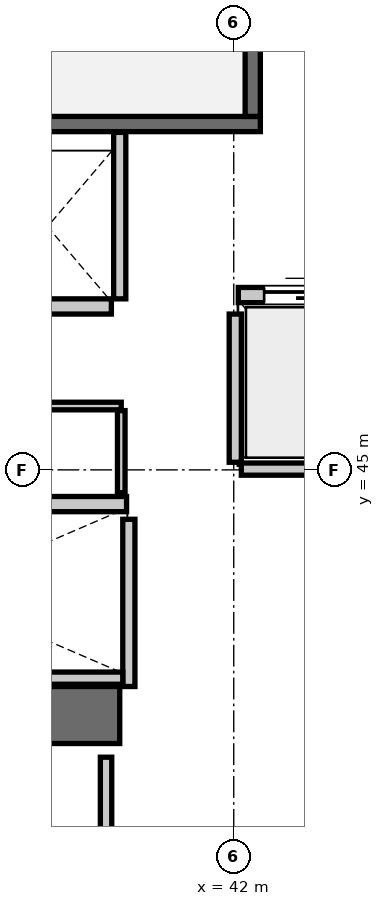
"""IFC4 building model, lengths in metres.
Left out: names, types, materials, properties, quantities, classifications, styles, units other than length and angle.
Written with IfcOpenShell. Run it as: python <this file> out.ifc"""

import sys

from ifc_helpers import new_model, si_unit, direction, frame, frame_2d, origin, place, context, subcontext, project, spatial, rectangle, extrude, element, fill, save


model = new_model("IFC4")
c1 = context("Model", 3, precision=1e-05, world=origin(), true_north=direction((0.0, 1.0)))
c2 = subcontext(c1, "Body", "Model", "MODEL_VIEW")
j1 = project(units=[si_unit("LENGTHUNIT", "METRE"), si_unit("PLANEANGLEUNIT", "RADIAN")], contexts=[c1])
p1 = place(None, origin())
s1 = spatial("IfcSite", under=j1, at=p1, CompositionType="ELEMENT")
p2 = place(p1, origin())
s2 = spatial("IfcBuilding", under=s1, at=p2, CompositionType="ELEMENT")
p3 = place(p2, frame((0.0, 0.0, 196.7)))
s3 = spatial("IfcBuildingStorey", under=s2, at=p3, CompositionType="ELEMENT", Elevation=196.7)
p4 = place(p3, frame((35.1, 41.775, 0.0), z_axis=(0.0, 0.0, 1.0), x_axis=(1.0, 0.0, 0.0)))
e1 = element("IfcWall", 1, at=p4, inside=s3, PredefinedType="SHEAR", context=c2, shape_type="SweptSolid", body=[
    extrude(rectangle(XDim=5.4, YDim=0.75, at=frame_2d((2.7, 0.0))), origin(), (0.0, 0.0, 1.0), 3.85),
])
p5 = place(p3, frame((33.25, 49.55, 0.0), z_axis=(0.0, 0.0, 1.0), x_axis=(1.0, 0.0, 0.0)))
e2 = element("IfcWall", 2, at=p5, inside=s3, PredefinedType="SOLIDWALL", context=c2, shape_type="SweptSolid", body=[
    extrude(rectangle(XDim=9.1, YDim=0.2, at=frame_2d((4.55, 0.0))), origin(), (0.0, 0.0, 1.0), 3.61),
])
p6 = place(p3, frame((42.25, 49.65, 0.0), z_axis=(0.0, 0.0, 1.0), x_axis=(0.0, 1.0, 0.0)))
e3 = element("IfcWall", 3, at=p6, inside=s3, PredefinedType="SOLIDWALL", context=c2, shape_type="SweptSolid", body=[
    extrude(rectangle(XDim=3.6, YDim=0.2, at=frame_2d((1.8, 0.0))), origin(), (0.0, 0.0, 1.0), 3.61),
])
p7 = place(p3, frame((42.06, 47.3, 0.0), z_axis=(0.0, 0.0, 1.0), x_axis=(1.0, 0.0, 0.0)))
e4 = element("IfcWall", 4, at=p7, inside=s3, PredefinedType="SOLIDWALL", context=c2, shape_type="SweptSolid", body=[
    extrude(rectangle(XDim=1.68, YDim=0.2, at=frame_2d((0.84, 0.0))), origin(), (0.0, 0.0, 1.0), 3.61),
])
p8 = place(p7, frame((0.34, 0.0, 0.0)))
e5 = element("IfcOpeningElement", 5, at=p8, cuts=e4, PredefinedType="OPENING", context=c2, shape_type="SweptSolid", body=[
    extrude(rectangle(XDim=1.0, YDim=2.15, at=frame_2d((0.5, 1.075))), frame((0.0, 0.11, 0.0), z_axis=(0.0, -1.0, 0.0), x_axis=(1.0, 0.0, 0.0)), (0.0, 0.0, 1.0), 0.22),
])
p9 = place(p3, frame((38.91, 44.55, 0.0), z_axis=(0.0, 0.0, 1.0), x_axis=(1.0, 0.0, 0.0)))
e6 = element("IfcWall", 6, at=p9, inside=s3, PredefinedType="SOLIDWALL", context=c2, shape_type="SweptSolid", body=[
    extrude(rectangle(XDim=1.68, YDim=0.2, at=frame_2d((0.84, 0.0))), origin(), (0.0, 0.0, 1.0), 3.61),
])
p10 = place(p3, frame((38.71, 47.15, 0.0), z_axis=(0.0, 0.0, 1.0), x_axis=(1.0, 0.0, 0.0)))
e7 = element("IfcWall", 7, at=p10, inside=s3, PredefinedType="SOLIDWALL", context=c2, shape_type="SweptSolid", body=[
    extrude(rectangle(XDim=1.68, YDim=0.2, at=frame_2d((0.84, 0.0))), origin(), (0.0, 0.0, 1.0), 3.61),
])
p11 = place(p3, frame((42.02, 45.1, 0.0), z_axis=(0.0, 0.0, 1.0), x_axis=(0.0, 1.0, 0.0)))
e8 = element("IfcWall", 8, at=p11, inside=s3, PredefinedType="SOLIDWALL", context=c2, shape_type="SweptSolid", body=[
    extrude(rectangle(XDim=1.95, YDim=0.16, at=frame_2d((0.975, 0.0))), origin(), (0.0, 0.0, 1.0), 3.61),
])
p12 = place(p3, frame((42.1, 45.01, 0.0), z_axis=(0.0, 0.0, 1.0), x_axis=(1.0, 0.0, 0.0)))
e9 = element("IfcWall", 9, at=p12, inside=s3, PredefinedType="SOLIDWALL", context=c2, shape_type="SweptSolid", body=[
    extrude(rectangle(XDim=3.45, YDim=0.16, at=frame_2d((1.725, 0.0))), origin(), (0.0, 0.0, 1.0), 3.61),
])
p13 = place(p3, frame((40.62, 42.15, 0.0), z_axis=(0.0, 0.0, 1.0), x_axis=(0.0, 1.0, 0.0)))
e10 = element("IfcWall", 10, at=p13, inside=s3, PredefinedType="SOLIDWALL", context=c2, shape_type="SweptSolid", body=[
    extrude(rectangle(XDim=2.2, YDim=0.16, at=frame_2d((1.1, 0.0))), origin(), (0.0, 0.0, 1.0), 3.61),
])
p14 = place(p3, frame((35.52, 42.26, 0.0), z_axis=(0.0, 0.0, 1.0), x_axis=(1.0, 0.0, 0.0)))
e11 = element("IfcWall", 11, at=p14, inside=s3, PredefinedType="SOLIDWALL", context=c2, shape_type="SweptSolid", body=[
    extrude(rectangle(XDim=5.02, YDim=0.16, at=frame_2d((2.51, 0.0))), origin(), (0.0, 0.0, 1.0), 3.61),
])
p15 = place(p3, frame((40.5, 47.25, 0.0), z_axis=(0.0, 0.0, 1.0), x_axis=(0.0, 1.0, 0.0)))
e12 = element("IfcWall", 12, at=p15, inside=s3, PredefinedType="SOLIDWALL", context=c2, shape_type="SweptSolid", body=[
    extrude(rectangle(XDim=2.19, YDim=0.16, at=frame_2d((1.095, 0.0))), origin(), (0.0, 0.0, 1.0), 3.61),
])
p16 = place(p3, frame((35.58, 45.84, 0.0), z_axis=(0.0, 0.0, 1.0), x_axis=(1.0, 0.0, 0.0)))
e13 = element("IfcWall", 13, at=p16, inside=s3, PredefinedType="PARTITIONING", context=c2, shape_type="SweptSolid", body=[
    extrude(rectangle(XDim=4.94, YDim=0.1, at=frame_2d((2.47, 0.0))), origin(), (0.0, 0.0, 1.0), 3.61),
])
p17 = place(p16, frame((1.8, 0.0, 0.0)))
e14 = element("IfcOpeningElement", 14, at=p17, cuts=e13, PredefinedType="OPENING", context=c2, shape_type="SweptSolid", body=[
    extrude(rectangle(XDim=0.8, YDim=2.05, at=frame_2d((0.4, 1.025))), frame((0.0, 0.06, 0.0), z_axis=(0.0, -1.0, 0.0), x_axis=(1.0, 0.0, 0.0)), (0.0, 0.0, 1.0), 0.12),
])
p18 = place(p3, frame((40.52, 44.7, 0.0), z_axis=(0.0, 0.0, 1.0), x_axis=(0.0, 1.0, 0.0)))
e15 = element("IfcWall", 15, at=p18, inside=s3, PredefinedType="PARTITIONING", context=c2, shape_type="SweptSolid", body=[
    extrude(rectangle(XDim=1.08, YDim=0.1, at=frame_2d((0.54, 0.0))), origin(), (0.0, 0.0, 1.0), 3.61),
])
p19 = place(p3, frame((40.32, 38.38, 0.0), z_axis=(0.0, 0.0, 1.0), x_axis=(0.0, 1.0, 0.0)))
e16 = element("IfcWall", 16, at=p19, inside=s3, PredefinedType="PARTITIONING", context=c2, shape_type="SweptSolid", body=[
    extrude(rectangle(XDim=2.84, YDim=0.15, at=frame_2d((1.42, 0.0))), origin(), (0.0, 0.0, 1.0), 3.61),
])
p20 = place(p8, origin())
e17 = element("IfcDoor", 17, at=p20, inside=s3, OperationType="SLIDING_TO_LEFT", PredefinedType="DOOR", context=c2, shape_type="SweptSolid", body=[
    extrude(rectangle(XDim=1.0, YDim=2.15, at=frame_2d((0.5, 1.075))), frame((0.0, 0.025, 0.0), z_axis=(0.0, -1.0, 0.0), x_axis=(1.0, 0.0, 0.0)), (0.0, 0.0, 1.0), 0.05),
])
fill(e5, e17)
save(model, sys.argv[1])
